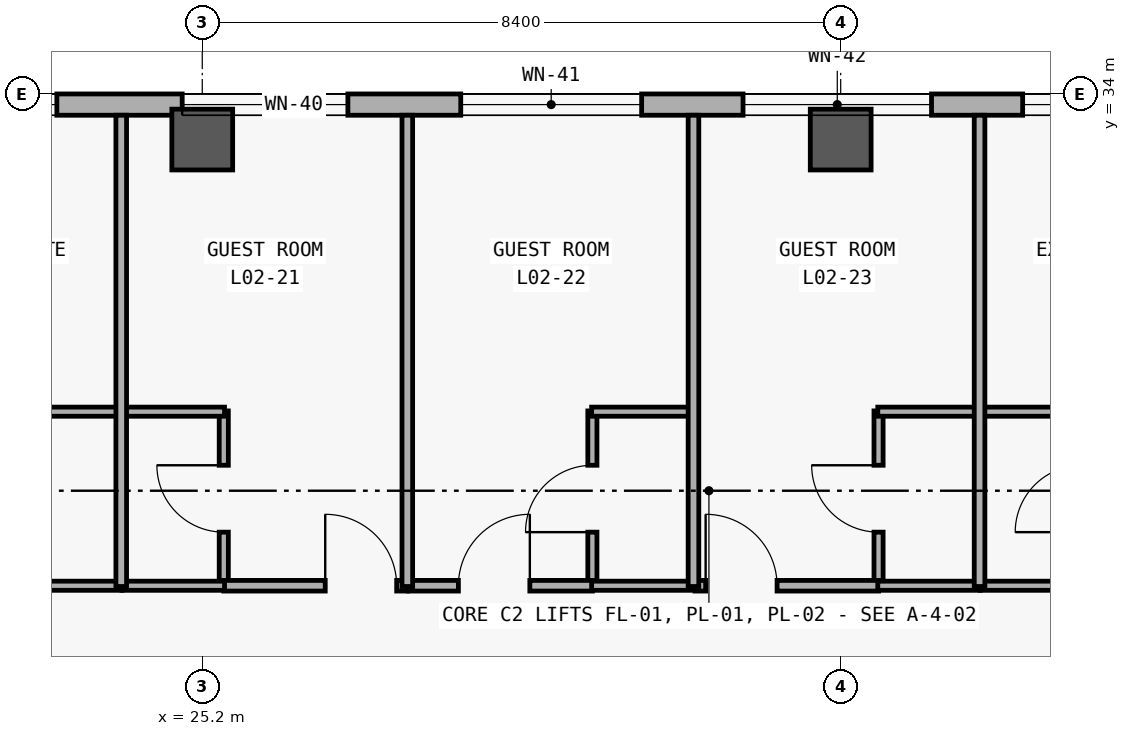
"""IFC4 building model, lengths in metres.
Left out: names, types, materials, properties, quantities, classifications, styles, units other than length and angle.
Written with IfcOpenShell. Run it as: python <this file> out.ifc"""

import sys

from ifc_helpers import new_model, si_unit, direction, frame, frame_2d, origin, origin_2d, place, context, subcontext, project, spatial, rectangle, extrude, element, fill, save


model = new_model("IFC4")
c1 = context("Model", 3, precision=1e-05, world=origin(), true_north=direction((0.0, 1.0)))
c2 = subcontext(c1, "Body", "Model", "MODEL_VIEW")
j1 = project(units=[si_unit("LENGTHUNIT", "METRE"), si_unit("PLANEANGLEUNIT", "RADIAN")], contexts=[c1])
p1 = place(None, origin())
s1 = spatial("IfcSite", under=j1, at=p1, CompositionType="ELEMENT")
p2 = place(p1, origin())
s2 = spatial("IfcBuilding", under=s1, at=p2, CompositionType="ELEMENT")
p3 = place(p2, frame((0.0, 0.0, 10.8)))
s3 = spatial("IfcBuildingStorey", under=s2, at=p3, CompositionType="ELEMENT", Elevation=10.8)
for number, where, z_axis, x_axis in (
    (1, (25.2, 33.4, 0.0), (0.0, 0.0, 1.0), (1.0, 0.0, 0.0)),
    (2, (33.6, 33.4, 0.0), (0.0, 0.0, 1.0), (1.0, 0.0, 0.0)),
):
    element("IfcColumn", number, at=place(p3, frame(where, z_axis=z_axis, x_axis=x_axis)), inside=s3, PredefinedType="COLUMN", context=c2, shape_type="SweptSolid", body=[
        extrude(rectangle(XDim=0.8, YDim=0.8, at=origin_2d()), origin(), (0.0, 0.0, 1.0), 4.2),
    ])
p4 = place(p3, frame((8.68, 33.86, 0.0), z_axis=(0.0, 0.0, 1.0), x_axis=(1.0, 0.0, 0.0)))
e3 = element("IfcWall", 3, at=p4, inside=s3, PredefinedType="SOLIDWALL", context=c2, shape_type="SweptSolid", body=[
    extrude(rectangle(XDim=83.44, YDim=0.28, at=frame_2d((41.72, 0.0))), origin(), (0.0, 0.0, 1.0), 3.92),
])
p5 = place(p4, frame((5.07, 0.0, 0.85)))
e4 = element("IfcOpeningElement", 4, at=p5, cuts=e3, PredefinedType="OPENING", context=c2, shape_type="SweptSolid", body=[
    extrude(rectangle(XDim=1.7, YDim=2.0, at=frame_2d((0.85, 1.0))), frame((0.0, 0.15, 0.0), z_axis=(0.0, -1.0, 0.0), x_axis=(1.0, 0.0, 0.0)), (0.0, 0.0, 1.0), 0.3),
])
p6 = place(p4, frame((12.557, 0.0, 0.85)))
e5 = element("IfcOpeningElement", 5, at=p6, cuts=e3, PredefinedType="OPENING", context=c2, shape_type="SweptSolid", body=[
    extrude(rectangle(XDim=2.05, YDim=1.95, at=frame_2d((1.025, 0.975))), frame((0.0, 0.15, 0.0), z_axis=(0.0, -1.0, 0.0), x_axis=(1.0, 0.0, 0.0)), (0.0, 0.0, 1.0), 0.3),
])
p7 = place(p4, frame((16.256, 0.0, 0.85)))
e6 = element("IfcOpeningElement", 6, at=p7, cuts=e3, PredefinedType="OPENING", context=c2, shape_type="SweptSolid", body=[
    extrude(rectangle(XDim=2.18, YDim=1.95, at=frame_2d((1.09, 0.975))), frame((0.0, 0.15, 0.0), z_axis=(0.0, -1.0, 0.0), x_axis=(1.0, 0.0, 0.0)), (0.0, 0.0, 1.0), 0.3),
])
p8 = place(p4, frame((19.921, 0.0, 0.85)))
e7 = element("IfcOpeningElement", 7, at=p8, cuts=e3, PredefinedType="OPENING", context=c2, shape_type="SweptSolid", body=[
    extrude(rectangle(XDim=2.38, YDim=1.95, at=frame_2d((1.19, 0.975))), frame((0.0, 0.15, 0.0), z_axis=(0.0, -1.0, 0.0), x_axis=(1.0, 0.0, 0.0)), (0.0, 0.0, 1.0), 0.3),
])
p9 = place(p4, frame((23.635, 0.0, 0.85)))
e8 = element("IfcOpeningElement", 8, at=p9, cuts=e3, PredefinedType="OPENING", context=c2, shape_type="SweptSolid", body=[
    extrude(rectangle(XDim=2.48, YDim=2.0, at=frame_2d((1.24, 1.0))), frame((0.0, 0.15, 0.0), z_axis=(0.0, -1.0, 0.0), x_axis=(1.0, 0.0, 0.0)), (0.0, 0.0, 1.0), 0.3),
])
p10 = place(p4, frame((27.314, 0.0, 0.85)))
e9 = element("IfcOpeningElement", 9, at=p10, cuts=e3, PredefinedType="OPENING", context=c2, shape_type="SweptSolid", body=[
    extrude(rectangle(XDim=2.65, YDim=2.0, at=frame_2d((1.325, 1.0))), frame((0.0, 0.15, 0.0), z_axis=(0.0, -1.0, 0.0), x_axis=(1.0, 0.0, 0.0)), (0.0, 0.0, 1.0), 0.3),
])
p11 = place(p4, frame((31.503, 0.0, 0.85)))
e10 = element("IfcOpeningElement", 10, at=p11, cuts=e3, PredefinedType="OPENING", context=c2, shape_type="SweptSolid", body=[
    extrude(rectangle(XDim=1.8, YDim=1.8, at=frame_2d((0.9, 0.9))), frame((0.0, 0.15, 0.0), z_axis=(0.0, -1.0, 0.0), x_axis=(1.0, 0.0, 0.0)), (0.0, 0.0, 1.0), 0.3),
])
p12 = place(p4, frame((35.117, 0.0, 0.85)))
e11 = element("IfcOpeningElement", 11, at=p12, cuts=e3, PredefinedType="OPENING", context=c2, shape_type="SweptSolid", body=[
    extrude(rectangle(XDim=2.1, YDim=1.8, at=frame_2d((1.05, 0.9))), frame((0.0, 0.15, 0.0), z_axis=(0.0, -1.0, 0.0), x_axis=(1.0, 0.0, 0.0)), (0.0, 0.0, 1.0), 0.3),
])
p13 = place(p4, frame((38.731, 0.0, 0.85)))
e12 = element("IfcOpeningElement", 12, at=p13, cuts=e3, PredefinedType="OPENING", context=c2, shape_type="SweptSolid", body=[
    extrude(rectangle(XDim=2.4, YDim=1.8, at=frame_2d((1.2, 0.9))), frame((0.0, 0.15, 0.0), z_axis=(0.0, -1.0, 0.0), x_axis=(1.0, 0.0, 0.0)), (0.0, 0.0, 1.0), 0.3),
])
p14 = place(p4, frame((42.346, 0.0, 0.85)))
e13 = element("IfcOpeningElement", 13, at=p14, cuts=e3, PredefinedType="OPENING", context=c2, shape_type="SweptSolid", body=[
    extrude(rectangle(XDim=2.7, YDim=1.85, at=frame_2d((1.35, 0.925))), frame((0.0, 0.15, 0.0), z_axis=(0.0, -1.0, 0.0), x_axis=(1.0, 0.0, 0.0)), (0.0, 0.0, 1.0), 0.3),
])
p15 = place(p4, frame((46.71, 0.0, 0.85)))
e14 = element("IfcOpeningElement", 14, at=p15, cuts=e3, PredefinedType="OPENING", context=c2, shape_type="SweptSolid", body=[
    extrude(rectangle(XDim=1.5, YDim=1.75, at=frame_2d((0.75, 0.875))), frame((0.0, 0.15, 0.0), z_axis=(0.0, -1.0, 0.0), x_axis=(1.0, 0.0, 0.0)), (0.0, 0.0, 1.0), 0.3),
])
p16 = place(p4, frame((50.399, 0.0, 0.85)))
e15 = element("IfcOpeningElement", 15, at=p16, cuts=e3, PredefinedType="OPENING", context=c2, shape_type="SweptSolid", body=[
    extrude(rectangle(XDim=1.65, YDim=1.75, at=frame_2d((0.825, 0.875))), frame((0.0, 0.15, 0.0), z_axis=(0.0, -1.0, 0.0), x_axis=(1.0, 0.0, 0.0)), (0.0, 0.0, 1.0), 0.3),
])
p17 = place(p4, frame((54.014, 0.0, 0.85)))
e16 = element("IfcOpeningElement", 16, at=p17, cuts=e3, PredefinedType="OPENING", context=c2, shape_type="SweptSolid", body=[
    extrude(rectangle(XDim=1.95, YDim=1.75, at=frame_2d((0.975, 0.875))), frame((0.0, 0.15, 0.0), z_axis=(0.0, -1.0, 0.0), x_axis=(1.0, 0.0, 0.0)), (0.0, 0.0, 1.0), 0.3),
])
p18 = place(p4, frame((57.628, 0.0, 0.85)))
e17 = element("IfcOpeningElement", 17, at=p18, cuts=e3, PredefinedType="OPENING", context=c2, shape_type="SweptSolid", body=[
    extrude(rectangle(XDim=2.25, YDim=1.75, at=frame_2d((1.125, 0.875))), frame((0.0, 0.15, 0.0), z_axis=(0.0, -1.0, 0.0), x_axis=(1.0, 0.0, 0.0)), (0.0, 0.0, 1.0), 0.3),
])
p19 = place(p4, frame((61.242, 0.0, 0.85)))
e18 = element("IfcOpeningElement", 18, at=p19, cuts=e3, PredefinedType="OPENING", context=c2, shape_type="SweptSolid", body=[
    extrude(rectangle(XDim=2.55, YDim=1.8, at=frame_2d((1.275, 0.9))), frame((0.0, 0.15, 0.0), z_axis=(0.0, -1.0, 0.0), x_axis=(1.0, 0.0, 0.0)), (0.0, 0.0, 1.0), 0.3),
])
p20 = place(p4, frame((64.856, 0.0, 0.85)))
e19 = element("IfcOpeningElement", 19, at=p20, cuts=e3, PredefinedType="OPENING", context=c2, shape_type="SweptSolid", body=[
    extrude(rectangle(XDim=2.85, YDim=1.85, at=frame_2d((1.425, 0.925))), frame((0.0, 0.15, 0.0), z_axis=(0.0, -1.0, 0.0), x_axis=(1.0, 0.0, 0.0)), (0.0, 0.0, 1.0), 0.3),
])
p21 = place(p4, frame((69.345, 0.0, 0.85)))
e20 = element("IfcOpeningElement", 20, at=p21, cuts=e3, PredefinedType="OPENING", context=c2, shape_type="SweptSolid", body=[
    extrude(rectangle(XDim=1.4, YDim=1.6, at=frame_2d((0.7, 0.8))), frame((0.0, 0.15, 0.0), z_axis=(0.0, -1.0, 0.0), x_axis=(1.0, 0.0, 0.0)), (0.0, 0.0, 1.0), 0.3),
])
p22 = place(p4, frame((73.009, 0.0, 0.85)))
e21 = element("IfcOpeningElement", 21, at=p22, cuts=e3, PredefinedType="OPENING", context=c2, shape_type="SweptSolid", body=[
    extrude(rectangle(XDim=1.6, YDim=1.6, at=frame_2d((0.8, 0.8))), frame((0.0, 0.15, 0.0), z_axis=(0.0, -1.0, 0.0), x_axis=(1.0, 0.0, 0.0)), (0.0, 0.0, 1.0), 0.3),
])
p23 = place(p4, frame((76.674, 0.0, 0.85)))
e22 = element("IfcOpeningElement", 22, at=p23, cuts=e3, PredefinedType="OPENING", context=c2, shape_type="SweptSolid", body=[
    extrude(rectangle(XDim=1.8, YDim=1.6, at=frame_2d((0.9, 0.8))), frame((0.0, 0.15, 0.0), z_axis=(0.0, -1.0, 0.0), x_axis=(1.0, 0.0, 0.0)), (0.0, 0.0, 1.0), 0.3),
])
p24 = place(p4, frame((80.338, 0.0, 0.85)))
e23 = element("IfcOpeningElement", 23, at=p24, cuts=e3, PredefinedType="OPENING", context=c2, shape_type="SweptSolid", body=[
    extrude(rectangle(XDim=2.0, YDim=1.65, at=frame_2d((1.0, 0.825))), frame((0.0, 0.15, 0.0), z_axis=(0.0, -1.0, 0.0), x_axis=(1.0, 0.0, 0.0)), (0.0, 0.0, 1.0), 0.3),
])
p25 = place(p3, frame((25.483, 27.52, 0.0), z_axis=(0.0, 0.0, 1.0), x_axis=(0.0, 1.0, 0.0)))
e24 = element("IfcWall", 24, at=p25, inside=s3, PredefinedType="PARTITIONING", context=c2, shape_type="SweptSolid", body=[
    extrude(rectangle(XDim=2.31, YDim=0.12, at=frame_2d((1.155, 0.0))), origin(), (0.0, 0.0, 1.0), 3.02),
])
p26 = place(p25, frame((0.715, 0.0, 0.0)))
e25 = element("IfcOpeningElement", 25, at=p26, cuts=e24, PredefinedType="OPENING", context=c2, shape_type="SweptSolid", body=[
    extrude(rectangle(XDim=0.88, YDim=2.15, at=frame_2d((0.44, 1.075))), frame((0.0, 0.07, 0.0), z_axis=(0.0, -1.0, 0.0), x_axis=(1.0, 0.0, 0.0)), (0.0, 0.0, 1.0), 0.14),
])
p27 = place(p3, frame((30.333, 27.52, 0.0), z_axis=(0.0, 0.0, 1.0), x_axis=(0.0, 1.0, 0.0)))
e26 = element("IfcWall", 26, at=p27, inside=s3, PredefinedType="PARTITIONING", context=c2, shape_type="SweptSolid", body=[
    extrude(rectangle(XDim=2.31, YDim=0.12, at=frame_2d((1.155, 0.0))), origin(), (0.0, 0.0, 1.0), 3.02),
])
p28 = place(p27, frame((0.715, 0.0, 0.0)))
e27 = element("IfcOpeningElement", 27, at=p28, cuts=e26, PredefinedType="OPENING", context=c2, shape_type="SweptSolid", body=[
    extrude(rectangle(XDim=0.88, YDim=2.15, at=frame_2d((0.44, 1.075))), frame((0.0, 0.07, 0.0), z_axis=(0.0, -1.0, 0.0), x_axis=(1.0, 0.0, 0.0)), (0.0, 0.0, 1.0), 0.14),
])
p29 = place(p3, frame((34.098, 27.52, 0.0), z_axis=(0.0, 0.0, 1.0), x_axis=(0.0, 1.0, 0.0)))
e28 = element("IfcWall", 28, at=p29, inside=s3, PredefinedType="PARTITIONING", context=c2, shape_type="SweptSolid", body=[
    extrude(rectangle(XDim=2.31, YDim=0.12, at=frame_2d((1.155, 0.0))), origin(), (0.0, 0.0, 1.0), 3.02),
])
p30 = place(p29, frame((0.715, 0.0, 0.0)))
e29 = element("IfcOpeningElement", 29, at=p30, cuts=e28, PredefinedType="OPENING", context=c2, shape_type="SweptSolid", body=[
    extrude(rectangle(XDim=0.88, YDim=2.15, at=frame_2d((0.44, 1.075))), frame((0.0, 0.07, 0.0), z_axis=(0.0, -1.0, 0.0), x_axis=(1.0, 0.0, 0.0)), (0.0, 0.0, 1.0), 0.14),
])
p31 = place(p3, frame((25.483, 27.53, 0.0), z_axis=(0.0, 0.0, 1.0), x_axis=(1.0, 0.0, 0.0)))
e30 = element("IfcWall", 30, at=p31, inside=s3, PredefinedType="PARTITIONING", context=c2, shape_type="SweptSolid", body=[
    extrude(rectangle(XDim=2.415, YDim=0.14, at=frame_2d((1.208, 0.0))), origin(), (0.0, 0.0, 1.0), 3.02),
])
p32 = place(p31, frame((1.335, 0.0, 0.0)))
e31 = element("IfcOpeningElement", 31, at=p32, cuts=e30, PredefinedType="OPENING", context=c2, shape_type="SweptSolid", body=[
    extrude(rectangle(XDim=0.94, YDim=2.2, at=frame_2d((0.47, 1.1))), frame((0.0, 0.08, 0.0), z_axis=(0.0, -1.0, 0.0), x_axis=(1.0, 0.0, 0.0)), (0.0, 0.0, 1.0), 0.16),
])
p33 = place(p3, frame((27.918, 27.53, 0.0), z_axis=(0.0, 0.0, 1.0), x_axis=(1.0, 0.0, 0.0)))
e32 = element("IfcWall", 32, at=p33, inside=s3, PredefinedType="PARTITIONING", context=c2, shape_type="SweptSolid", body=[
    extrude(rectangle(XDim=2.415, YDim=0.14, at=frame_2d((1.208, 0.0))), origin(), (0.0, 0.0, 1.0), 3.02),
])
p34 = place(p33, frame((0.652, 0.0, 0.0)))
e33 = element("IfcOpeningElement", 33, at=p34, cuts=e32, PredefinedType="OPENING", context=c2, shape_type="SweptSolid", body=[
    extrude(rectangle(XDim=0.94, YDim=2.2, at=frame_2d((0.47, 1.1))), frame((0.0, 0.08, 0.0), z_axis=(0.0, -1.0, 0.0), x_axis=(1.0, 0.0, 0.0)), (0.0, 0.0, 1.0), 0.16),
])
p35 = place(p3, frame((31.683, 27.53, 0.0), z_axis=(0.0, 0.0, 1.0), x_axis=(1.0, 0.0, 0.0)))
e34 = element("IfcWall", 34, at=p35, inside=s3, PredefinedType="PARTITIONING", context=c2, shape_type="SweptSolid", body=[
    extrude(rectangle(XDim=2.415, YDim=0.14, at=frame_2d((1.208, 0.0))), origin(), (0.0, 0.0, 1.0), 3.02),
])
p36 = place(p35, frame((0.14, 0.0, 0.0)))
e35 = element("IfcOpeningElement", 35, at=p36, cuts=e34, PredefinedType="OPENING", context=c2, shape_type="SweptSolid", body=[
    extrude(rectangle(XDim=0.94, YDim=2.2, at=frame_2d((0.47, 1.1))), frame((0.0, 0.08, 0.0), z_axis=(0.0, -1.0, 0.0), x_axis=(1.0, 0.0, 0.0)), (0.0, 0.0, 1.0), 0.16),
])
for number, where, z_axis, x_axis in (
    (36, (22.795, 27.53, 0.0), (0.0, 0.0, 1.0), (1.0, 0.0, 0.0)),
    (37, (22.795, 29.82, 0.0), (0.0, 0.0, 1.0), (1.0, 0.0, 0.0)),
):
    element("IfcWall", number, at=place(p3, frame(where, z_axis=z_axis, x_axis=x_axis)), inside=s3, PredefinedType="PARTITIONING", context=c2, shape_type="SweptSolid", body=[
        extrude(rectangle(XDim=1.349, YDim=0.12, at=frame_2d((0.675, 0.0))), origin(), (0.0, 0.0, 1.0), 3.02),
    ])
for number, where, z_axis, x_axis in (
    (38, (24.144, 27.53, 0.0), (0.0, 0.0, 1.0), (1.0, 0.0, 0.0)),
    (39, (24.144, 29.82, 0.0), (0.0, 0.0, 1.0), (1.0, 0.0, 0.0)),
):
    element("IfcWall", number, at=place(p3, frame(where, z_axis=z_axis, x_axis=x_axis)), inside=s3, PredefinedType="PARTITIONING", context=c2, shape_type="SweptSolid", body=[
        extrude(rectangle(XDim=1.349, YDim=0.12, at=frame_2d((0.674, 0.0))), origin(), (0.0, 0.0, 1.0), 3.02),
    ])
for number, where, z_axis, x_axis in (
    (40, (30.323, 27.53, 0.0), (0.0, 0.0, 1.0), (1.0, 0.0, 0.0)),
    (41, (30.323, 29.82, 0.0), (0.0, 0.0, 1.0), (1.0, 0.0, 0.0)),
):
    element("IfcWall", number, at=place(p3, frame(where, z_axis=z_axis, x_axis=x_axis)), inside=s3, PredefinedType="PARTITIONING", context=c2, shape_type="SweptSolid", body=[
        extrude(rectangle(XDim=1.35, YDim=0.12, at=frame_2d((0.675, 0.0))), origin(), (0.0, 0.0, 1.0), 3.02),
    ])
for number, where, z_axis, x_axis in (
    (42, (34.088, 27.53, 0.0), (0.0, 0.0, 1.0), (1.0, 0.0, 0.0)),
    (43, (34.088, 29.82, 0.0), (0.0, 0.0, 1.0), (1.0, 0.0, 0.0)),
):
    element("IfcWall", number, at=place(p3, frame(where, z_axis=z_axis, x_axis=x_axis)), inside=s3, PredefinedType="PARTITIONING", context=c2, shape_type="SweptSolid", body=[
        extrude(rectangle(XDim=1.349, YDim=0.12, at=frame_2d((0.675, 0.0))), origin(), (0.0, 0.0, 1.0), 3.02),
    ])
for number, where, z_axis, x_axis in (
    (44, (35.437, 27.53, 0.0), (0.0, 0.0, 1.0), (1.0, 0.0, 0.0)),
    (45, (35.437, 29.82, 0.0), (0.0, 0.0, 1.0), (1.0, 0.0, 0.0)),
):
    element("IfcWall", number, at=place(p3, frame(where, z_axis=z_axis, x_axis=x_axis)), inside=s3, PredefinedType="PARTITIONING", context=c2, shape_type="SweptSolid", body=[
        extrude(rectangle(XDim=1.349, YDim=0.12, at=frame_2d((0.674, 0.0))), origin(), (0.0, 0.0, 1.0), 3.02),
    ])
for number, where, z_axis, x_axis in (
    (46, (24.134, 27.52, 0.0), (0.0, 0.0, 1.0), (0.0, 1.0, 0.0)),
    (47, (27.898, 27.52, 0.0), (0.0, 0.0, 1.0), (0.0, 1.0, 0.0)),
    (48, (31.663, 27.52, 0.0), (0.0, 0.0, 1.0), (0.0, 1.0, 0.0)),
    (49, (35.427, 27.52, 0.0), (0.0, 0.0, 1.0), (0.0, 1.0, 0.0)),
):
    element("IfcWall", number, at=place(p3, frame(where, z_axis=z_axis, x_axis=x_axis)), inside=s3, PredefinedType="PARTITIONING", context=c2, shape_type="SweptSolid", body=[
        extrude(rectangle(XDim=6.2, YDim=0.14, at=frame_2d((3.1, 0.0))), origin(), (0.0, 0.0, 1.0), 3.02),
    ])
p37 = place(p6, origin())
e50 = element("IfcWindow", 50, at=p37, inside=s3, PartitioningType="SINGLE_PANEL", PredefinedType="WINDOW", context=c2, shape_type="SweptSolid", body=[
    extrude(rectangle(XDim=2.05, YDim=1.95, at=frame_2d((1.025, 0.975))), frame((0.0, 0.03, 0.0), z_axis=(0.0, -1.0, 0.0), x_axis=(1.0, 0.0, 0.0)), (0.0, 0.0, 1.0), 0.06),
])
fill(e5, e50)
p38 = place(p7, origin())
e51 = element("IfcWindow", 51, at=p38, inside=s3, PartitioningType="SINGLE_PANEL", PredefinedType="WINDOW", context=c2, shape_type="SweptSolid", body=[
    extrude(rectangle(XDim=2.18, YDim=1.95, at=frame_2d((1.09, 0.975))), frame((0.0, 0.03, 0.0), z_axis=(0.0, -1.0, 0.0), x_axis=(1.0, 0.0, 0.0)), (0.0, 0.0, 1.0), 0.06),
])
fill(e6, e51)
p39 = place(p8, origin())
e52 = element("IfcWindow", 52, at=p39, inside=s3, PartitioningType="SINGLE_PANEL", PredefinedType="WINDOW", context=c2, shape_type="SweptSolid", body=[
    extrude(rectangle(XDim=2.38, YDim=1.95, at=frame_2d((1.19, 0.975))), frame((0.0, 0.03, 0.0), z_axis=(0.0, -1.0, 0.0), x_axis=(1.0, 0.0, 0.0)), (0.0, 0.0, 1.0), 0.06),
])
fill(e7, e52)
p40 = place(p9, origin())
e53 = element("IfcWindow", 53, at=p40, inside=s3, PartitioningType="SINGLE_PANEL", PredefinedType="WINDOW", context=c2, shape_type="SweptSolid", body=[
    extrude(rectangle(XDim=2.48, YDim=2.0, at=frame_2d((1.24, 1.0))), frame((0.0, 0.03, 0.0), z_axis=(0.0, -1.0, 0.0), x_axis=(1.0, 0.0, 0.0)), (0.0, 0.0, 1.0), 0.06),
])
fill(e8, e53)
p41 = place(p10, origin())
e54 = element("IfcWindow", 54, at=p41, inside=s3, PartitioningType="SINGLE_PANEL", PredefinedType="WINDOW", context=c2, shape_type="SweptSolid", body=[
    extrude(rectangle(XDim=2.65, YDim=2.0, at=frame_2d((1.325, 1.0))), frame((0.0, 0.03, 0.0), z_axis=(0.0, -1.0, 0.0), x_axis=(1.0, 0.0, 0.0)), (0.0, 0.0, 1.0), 0.06),
])
fill(e9, e54)
p42 = place(p26, origin())
e55 = element("IfcDoor", 55, at=p42, inside=s3, OperationType="SINGLE_SWING_RIGHT", PredefinedType="DOOR", context=c2, shape_type="SweptSolid", body=[
    extrude(rectangle(XDim=0.88, YDim=2.15, at=frame_2d((0.44, 1.075))), frame((0.0, 0.025, 0.0), z_axis=(0.0, -1.0, 0.0), x_axis=(1.0, 0.0, 0.0)), (0.0, 0.0, 1.0), 0.05),
])
fill(e25, e55)
p43 = place(p28, origin())
e56 = element("IfcDoor", 56, at=p43, inside=s3, OperationType="SINGLE_SWING_LEFT", PredefinedType="DOOR", context=c2, shape_type="SweptSolid", body=[
    extrude(rectangle(XDim=0.88, YDim=2.15, at=frame_2d((0.44, 1.075))), frame((0.0, 0.025, 0.0), z_axis=(0.0, -1.0, 0.0), x_axis=(1.0, 0.0, 0.0)), (0.0, 0.0, 1.0), 0.05),
])
fill(e27, e56)
p44 = place(p30, origin())
e57 = element("IfcDoor", 57, at=p44, inside=s3, OperationType="SINGLE_SWING_RIGHT", PredefinedType="DOOR", context=c2, shape_type="SweptSolid", body=[
    extrude(rectangle(XDim=0.88, YDim=2.15, at=frame_2d((0.44, 1.075))), frame((0.0, 0.025, 0.0), z_axis=(0.0, -1.0, 0.0), x_axis=(1.0, 0.0, 0.0)), (0.0, 0.0, 1.0), 0.05),
])
fill(e29, e57)
p45 = place(p32, origin())
e58 = element("IfcDoor", 58, at=p45, inside=s3, OperationType="SINGLE_SWING_LEFT", PredefinedType="DOOR", context=c2, shape_type="SweptSolid", body=[
    extrude(rectangle(XDim=0.94, YDim=2.2, at=frame_2d((0.47, 1.1))), frame((0.0, 0.025, 0.0), z_axis=(0.0, -1.0, 0.0), x_axis=(1.0, 0.0, 0.0)), (0.0, 0.0, 1.0), 0.05),
])
fill(e31, e58)
p46 = place(p34, origin())
e59 = element("IfcDoor", 59, at=p46, inside=s3, OperationType="SINGLE_SWING_RIGHT", PredefinedType="DOOR", context=c2, shape_type="SweptSolid", body=[
    extrude(rectangle(XDim=0.94, YDim=2.2, at=frame_2d((0.47, 1.1))), frame((0.0, 0.025, 0.0), z_axis=(0.0, -1.0, 0.0), x_axis=(1.0, 0.0, 0.0)), (0.0, 0.0, 1.0), 0.05),
])
fill(e33, e59)
p47 = place(p36, origin())
e60 = element("IfcDoor", 60, at=p47, inside=s3, OperationType="SINGLE_SWING_LEFT", PredefinedType="DOOR", context=c2, shape_type="SweptSolid", body=[
    extrude(rectangle(XDim=0.94, YDim=2.2, at=frame_2d((0.47, 1.1))), frame((0.0, 0.025, 0.0), z_axis=(0.0, -1.0, 0.0), x_axis=(1.0, 0.0, 0.0)), (0.0, 0.0, 1.0), 0.05),
])
fill(e35, e60)
save(model, sys.argv[1])
